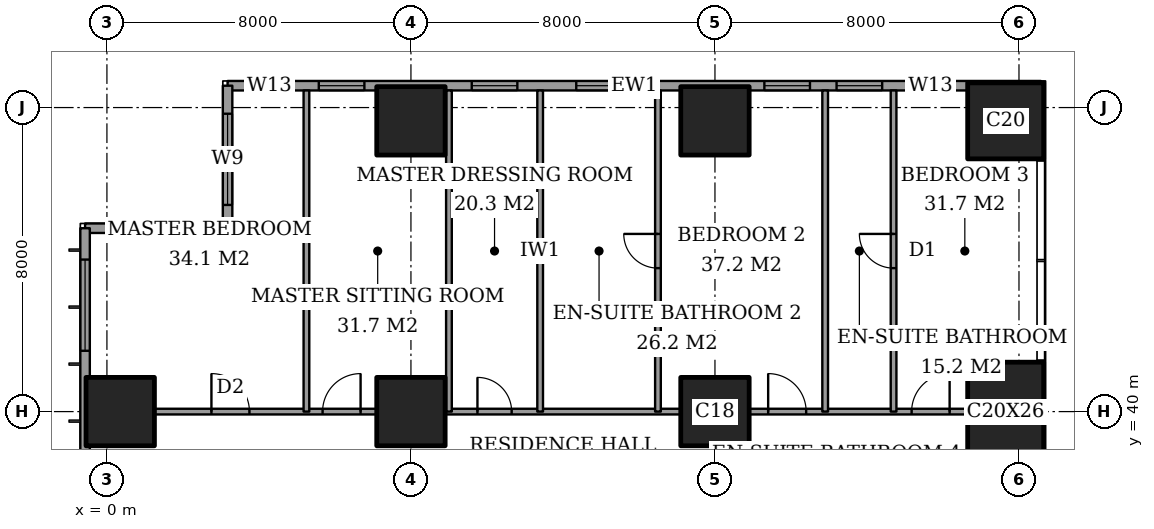
"""IFC4 building model, lengths in metres.
Left out: names, types, materials, properties, quantities, classifications, styles, units other than length and angle.
Written with IfcOpenShell. Run it as: python <this file> out.ifc"""

import sys

from ifc_helpers import new_model, si_unit, direction, frame, frame_2d, origin, origin_2d, place, context, subcontext, project, spatial, rectangle, extrude, element, fill, save


model = new_model("IFC4")
c1 = context("Model", 3, precision=1e-05, world=origin(), true_north=direction((0.0, 1.0)))
c2 = subcontext(c1, "Body", "Model", "MODEL_VIEW")
j1 = project(units=[si_unit("LENGTHUNIT", "METRE"), si_unit("PLANEANGLEUNIT", "RADIAN")], contexts=[c1])
p1 = place(None, origin())
s1 = spatial("IfcSite", under=j1, at=p1, CompositionType="ELEMENT")
p2 = place(p1, origin())
s2 = spatial("IfcBuilding", under=s1, at=p2, CompositionType="ELEMENT")
p3 = place(p2, frame((0.0, 0.0, 185.8)))
s3 = spatial("IfcBuildingStorey", under=s2, at=p3, CompositionType="ELEMENT", Elevation=185.8)
for number, where, z_axis, x_axis in (
    (1, (0.35, 40.0, 0.0), (0.0, 0.0, 1.0), (1.0, 0.0, 0.0)),
    (2, (8.0, 40.0, 0.0), (0.0, 0.0, 1.0), (1.0, 0.0, 0.0)),
    (3, (8.0, 47.65, 0.0), (0.0, 0.0, 1.0), (1.0, 0.0, 0.0)),
    (4, (16.0, 40.0, 0.0), (0.0, 0.0, 1.0), (1.0, 0.0, 0.0)),
    (5, (16.0, 47.65, 0.0), (0.0, 0.0, 1.0), (1.0, 0.0, 0.0)),
):
    element("IfcColumn", number, at=place(p3, frame(where, z_axis=z_axis, x_axis=x_axis)), inside=s3, PredefinedType="COLUMN", context=c2, shape_type="SweptSolid", body=[
        extrude(rectangle(XDim=1.8, YDim=1.8, at=origin_2d()), origin(), (0.0, 0.0, 1.0), 3.6),
    ])
p4 = place(p3, frame((23.65, 40.0, 0.0), z_axis=(0.0, 0.0, 1.0), x_axis=(1.0, 0.0, 0.0)))
e6 = element("IfcColumn", 6, at=p4, inside=s3, PredefinedType="COLUMN", context=c2, shape_type="SweptSolid", body=[
    extrude(rectangle(XDim=2.0, YDim=2.6, at=origin_2d()), origin(), (0.0, 0.0, 1.0), 3.6),
])
p5 = place(p3, frame((23.65, 47.65, 0.0), z_axis=(0.0, 0.0, 1.0), x_axis=(1.0, 0.0, 0.0)))
e7 = element("IfcColumn", 7, at=p5, inside=s3, PredefinedType="COLUMN", context=c2, shape_type="SweptSolid", body=[
    extrude(rectangle(XDim=2.0, YDim=2.0, at=origin_2d()), origin(), (0.0, 0.0, 1.0), 3.6),
])
p6 = place(p3, frame((24.575, 48.575, 0.0), z_axis=(0.0, 0.0, 1.0), x_axis=(-1.0, 0.0, 0.0)))
e8 = element("IfcWall", 8, at=p6, inside=s3, PredefinedType="SOLIDWALL", context=c2, shape_type="SweptSolid", body=[
    extrude(rectangle(XDim=21.4, YDim=0.25, at=frame_2d((10.7, 0.0))), origin(), (0.0, 0.0, 1.0), 3.6),
])
p7 = place(p6, frame((2.3, 0.0, 0.2)))
e9 = element("IfcOpeningElement", 9, at=p7, cuts=e8, PredefinedType="OPENING", context=c2, shape_type="SweptSolid", body=[
    extrude(rectangle(XDim=1.2, YDim=2.4, at=frame_2d((0.6, 1.2))), frame((0.0, 0.135, 0.0), z_axis=(0.0, -1.0, 0.0), x_axis=(1.0, 0.0, 0.0)), (0.0, 0.0, 1.0), 0.27),
])
p8 = place(p6, frame((4.175, 0.0, 0.2)))
e10 = element("IfcOpeningElement", 10, at=p8, cuts=e8, PredefinedType="OPENING", context=c2, shape_type="SweptSolid", body=[
    extrude(rectangle(XDim=1.2, YDim=2.4, at=frame_2d((0.6, 1.2))), frame((0.0, 0.135, 0.0), z_axis=(0.0, -1.0, 0.0), x_axis=(1.0, 0.0, 0.0)), (0.0, 0.0, 1.0), 0.27),
])
p9 = place(p6, frame((6.075, 0.0, 0.2)))
e11 = element("IfcOpeningElement", 11, at=p9, cuts=e8, PredefinedType="OPENING", context=c2, shape_type="SweptSolid", body=[
    extrude(rectangle(XDim=1.2, YDim=2.4, at=frame_2d((0.6, 1.2))), frame((0.0, 0.135, 0.0), z_axis=(0.0, -1.0, 0.0), x_axis=(1.0, 0.0, 0.0)), (0.0, 0.0, 1.0), 0.27),
])
p10 = place(p6, frame((11.025, 0.0, 0.2)))
e12 = element("IfcOpeningElement", 12, at=p10, cuts=e8, PredefinedType="OPENING", context=c2, shape_type="SweptSolid", body=[
    extrude(rectangle(XDim=1.2, YDim=2.4, at=frame_2d((0.6, 1.2))), frame((0.0, 0.135, 0.0), z_axis=(0.0, -1.0, 0.0), x_axis=(1.0, 0.0, 0.0)), (0.0, 0.0, 1.0), 0.27),
])
p11 = place(p6, frame((13.775, 0.0, 0.2)))
e13 = element("IfcOpeningElement", 13, at=p11, cuts=e8, PredefinedType="OPENING", context=c2, shape_type="SweptSolid", body=[
    extrude(rectangle(XDim=1.2, YDim=2.4, at=frame_2d((0.6, 1.2))), frame((0.0, 0.135, 0.0), z_axis=(0.0, -1.0, 0.0), x_axis=(1.0, 0.0, 0.0)), (0.0, 0.0, 1.0), 0.27),
])
p12 = place(p6, frame((17.8, 0.0, 0.2)))
e14 = element("IfcOpeningElement", 14, at=p12, cuts=e8, PredefinedType="OPENING", context=c2, shape_type="SweptSolid", body=[
    extrude(rectangle(XDim=1.2, YDim=2.4, at=frame_2d((0.6, 1.2))), frame((0.0, 0.135, 0.0), z_axis=(0.0, -1.0, 0.0), x_axis=(1.0, 0.0, 0.0)), (0.0, 0.0, 1.0), 0.27),
])
p13 = place(p6, frame((19.7, 0.0, 0.2)))
e15 = element("IfcOpeningElement", 15, at=p13, cuts=e8, PredefinedType="OPENING", context=c2, shape_type="SweptSolid", body=[
    extrude(rectangle(XDim=1.2, YDim=2.4, at=frame_2d((0.6, 1.2))), frame((0.0, 0.135, 0.0), z_axis=(0.0, -1.0, 0.0), x_axis=(1.0, 0.0, 0.0)), (0.0, 0.0, 1.0), 0.27),
])
p14 = place(p3, frame((3.175, 48.575, 0.0), z_axis=(0.0, 0.0, 1.0), x_axis=(0.0, -1.0, 0.0)))
e16 = element("IfcWall", 16, at=p14, inside=s3, PredefinedType="SOLIDWALL", context=c2, shape_type="SweptSolid", body=[
    extrude(rectangle(XDim=3.75, YDim=0.25, at=frame_2d((1.875, 0.0))), origin(), (0.0, 0.0, 1.0), 3.6),
])
p15 = place(p14, frame((0.738, 0.0, 0.2)))
e17 = element("IfcOpeningElement", 17, at=p15, cuts=e16, PredefinedType="OPENING", context=c2, shape_type="SweptSolid", body=[
    extrude(rectangle(XDim=2.4, YDim=2.4, at=frame_2d((1.2, 1.2))), frame((0.0, 0.135, 0.0), z_axis=(0.0, -1.0, 0.0), x_axis=(1.0, 0.0, 0.0)), (0.0, 0.0, 1.0), 0.27),
])
p16 = place(p3, frame((3.175, 44.825, 0.0), z_axis=(0.0, 0.0, 1.0), x_axis=(-1.0, 0.0, 0.0)))
e18 = element("IfcWall", 18, at=p16, inside=s3, PredefinedType="SOLIDWALL", context=c2, shape_type="SweptSolid", body=[
    extrude(rectangle(XDim=3.75, YDim=0.25, at=frame_2d((1.875, 0.0))), origin(), (0.0, 0.0, 1.0), 3.6),
])
p17 = place(p16, frame((0.613, 0.0, 0.2)))
e19 = element("IfcOpeningElement", 19, at=p17, cuts=e18, PredefinedType="OPENING", context=c2, shape_type="SweptSolid", body=[
    extrude(rectangle(XDim=2.4, YDim=2.4, at=frame_2d((1.2, 1.2))), frame((0.0, 0.135, 0.0), z_axis=(0.0, -1.0, 0.0), x_axis=(1.0, 0.0, 0.0)), (0.0, 0.0, 1.0), 0.27),
])
p18 = place(p3, frame((-0.575, 44.825, 0.0), z_axis=(0.0, 0.0, 1.0), x_axis=(0.0, -1.0, 0.0)))
e20 = element("IfcWall", 20, at=p18, inside=s3, PredefinedType="SOLIDWALL", context=c2, shape_type="SweptSolid", body=[
    extrude(rectangle(XDim=41.65, YDim=0.25, at=frame_2d((20.825, 0.0))), origin(), (0.0, 0.0, 1.0), 3.6),
])
p19 = place(p18, frame((0.825, 0.0, 0.2)))
e21 = element("IfcOpeningElement", 21, at=p19, cuts=e20, PredefinedType="OPENING", context=c2, shape_type="SweptSolid", body=[
    extrude(rectangle(XDim=2.4, YDim=2.4, at=frame_2d((1.2, 1.2))), frame((0.0, 0.135, 0.0), z_axis=(0.0, -1.0, 0.0), x_axis=(1.0, 0.0, 0.0)), (0.0, 0.0, 1.0), 0.27),
])
p20 = place(p18, frame((6.05, 0.0, 0.2)))
e22 = element("IfcOpeningElement", 22, at=p20, cuts=e20, PredefinedType="OPENING", context=c2, shape_type="SweptSolid", body=[
    extrude(rectangle(XDim=1.2, YDim=2.4, at=frame_2d((0.6, 1.2))), frame((0.0, 0.135, 0.0), z_axis=(0.0, -1.0, 0.0), x_axis=(1.0, 0.0, 0.0)), (0.0, 0.0, 1.0), 0.27),
])
p21 = place(p18, frame((8.475, 0.0, 0.2)))
e23 = element("IfcOpeningElement", 23, at=p21, cuts=e20, PredefinedType="OPENING", context=c2, shape_type="SweptSolid", body=[
    extrude(rectangle(XDim=2.4, YDim=2.4, at=frame_2d((1.2, 1.2))), frame((0.0, 0.135, 0.0), z_axis=(0.0, -1.0, 0.0), x_axis=(1.0, 0.0, 0.0)), (0.0, 0.0, 1.0), 0.27),
])
p22 = place(p18, frame((15.625, 0.0, 0.2)))
e24 = element("IfcOpeningElement", 24, at=p22, cuts=e20, PredefinedType="OPENING", context=c2, shape_type="SweptSolid", body=[
    extrude(rectangle(XDim=2.4, YDim=2.4, at=frame_2d((1.2, 1.2))), frame((0.0, 0.135, 0.0), z_axis=(0.0, -1.0, 0.0), x_axis=(1.0, 0.0, 0.0)), (0.0, 0.0, 1.0), 0.27),
])
p23 = place(p18, frame((23.625, 0.0, 0.2)))
e25 = element("IfcOpeningElement", 25, at=p23, cuts=e20, PredefinedType="OPENING", context=c2, shape_type="SweptSolid", body=[
    extrude(rectangle(XDim=2.4, YDim=2.4, at=frame_2d((1.2, 1.2))), frame((0.0, 0.135, 0.0), z_axis=(0.0, -1.0, 0.0), x_axis=(1.0, 0.0, 0.0)), (0.0, 0.0, 1.0), 0.27),
])
p24 = place(p18, frame((30.775, 0.0, 0.2)))
e26 = element("IfcOpeningElement", 26, at=p24, cuts=e20, PredefinedType="OPENING", context=c2, shape_type="SweptSolid", body=[
    extrude(rectangle(XDim=2.4, YDim=2.4, at=frame_2d((1.2, 1.2))), frame((0.0, 0.135, 0.0), z_axis=(0.0, -1.0, 0.0), x_axis=(1.0, 0.0, 0.0)), (0.0, 0.0, 1.0), 0.27),
])
p25 = place(p18, frame((34.55, 0.0, 0.2)))
e27 = element("IfcOpeningElement", 27, at=p25, cuts=e20, PredefinedType="OPENING", context=c2, shape_type="SweptSolid", body=[
    extrude(rectangle(XDim=1.2, YDim=2.4, at=frame_2d((0.6, 1.2))), frame((0.0, 0.135, 0.0), z_axis=(0.0, -1.0, 0.0), x_axis=(1.0, 0.0, 0.0)), (0.0, 0.0, 1.0), 0.27),
])
p26 = place(p18, frame((38.425, 0.0, 0.2)))
e28 = element("IfcOpeningElement", 28, at=p26, cuts=e20, PredefinedType="OPENING", context=c2, shape_type="SweptSolid", body=[
    extrude(rectangle(XDim=2.4, YDim=2.4, at=frame_2d((1.2, 1.2))), frame((0.0, 0.135, 0.0), z_axis=(0.0, -1.0, 0.0), x_axis=(1.0, 0.0, 0.0)), (0.0, 0.0, 1.0), 0.27),
])
p27 = place(p3, frame((1.25, 40.0, 0.0), z_axis=(0.0, 0.0, 1.0), x_axis=(1.0, 0.0, 0.0)))
e29 = element("IfcWall", 29, at=p27, inside=s3, PredefinedType="PARTITIONING", context=c2, shape_type="SweptSolid", body=[
    extrude(rectangle(XDim=5.85, YDim=0.15, at=frame_2d((2.925, 0.0))), origin(), (0.0, 0.0, 1.0), 3.35),
])
p28 = place(p27, frame((1.5, 0.0, 0.0)))
e30 = element("IfcOpeningElement", 30, at=p28, cuts=e29, PredefinedType="OPENING", context=c2, shape_type="SweptSolid", body=[
    extrude(rectangle(XDim=1.0, YDim=2.1, at=frame_2d((0.5, 1.05))), frame((0.0, 0.085, 0.0), z_axis=(0.0, -1.0, 0.0), x_axis=(1.0, 0.0, 0.0)), (0.0, 0.0, 1.0), 0.17),
])
p29 = place(p27, frame((4.425, 0.0, 0.0)))
e31 = element("IfcOpeningElement", 31, at=p29, cuts=e29, PredefinedType="OPENING", context=c2, shape_type="SweptSolid", body=[
    extrude(rectangle(XDim=1.0, YDim=2.1, at=frame_2d((0.5, 1.05))), frame((0.0, 0.085, 0.0), z_axis=(0.0, -1.0, 0.0), x_axis=(1.0, 0.0, 0.0)), (0.0, 0.0, 1.0), 0.17),
])
p30 = place(p3, frame((8.9, 40.0, 0.0), z_axis=(0.0, 0.0, 1.0), x_axis=(1.0, 0.0, 0.0)))
e32 = element("IfcWall", 32, at=p30, inside=s3, PredefinedType="PARTITIONING", context=c2, shape_type="SweptSolid", body=[
    extrude(rectangle(XDim=6.2, YDim=0.15, at=frame_2d((3.1, 0.0))), origin(), (0.0, 0.0, 1.0), 3.35),
])
p31 = place(p30, frame((0.85, 0.0, 0.0)))
e33 = element("IfcOpeningElement", 33, at=p31, cuts=e32, PredefinedType="OPENING", context=c2, shape_type="SweptSolid", body=[
    extrude(rectangle(XDim=0.9, YDim=2.1, at=frame_2d((0.45, 1.05))), frame((0.0, 0.085, 0.0), z_axis=(0.0, -1.0, 0.0), x_axis=(1.0, 0.0, 0.0)), (0.0, 0.0, 1.0), 0.17),
])
p32 = place(p3, frame((16.9, 40.0, 0.0), z_axis=(0.0, 0.0, 1.0), x_axis=(1.0, 0.0, 0.0)))
e34 = element("IfcWall", 34, at=p32, inside=s3, PredefinedType="PARTITIONING", context=c2, shape_type="SweptSolid", body=[
    extrude(rectangle(XDim=5.75, YDim=0.15, at=frame_2d((2.875, 0.0))), origin(), (0.0, 0.0, 1.0), 3.35),
])
p33 = place(p32, frame((0.5, 0.0, 0.0)))
e35 = element("IfcOpeningElement", 35, at=p33, cuts=e34, PredefinedType="OPENING", context=c2, shape_type="SweptSolid", body=[
    extrude(rectangle(XDim=1.0, YDim=2.1, at=frame_2d((0.5, 1.05))), frame((0.0, 0.085, 0.0), z_axis=(0.0, -1.0, 0.0), x_axis=(1.0, 0.0, 0.0)), (0.0, 0.0, 1.0), 0.17),
])
p34 = place(p32, frame((4.275, 0.0, 0.0)))
e36 = element("IfcOpeningElement", 36, at=p34, cuts=e34, PredefinedType="OPENING", context=c2, shape_type="SweptSolid", body=[
    extrude(rectangle(XDim=1.0, YDim=2.1, at=frame_2d((0.5, 1.05))), frame((0.0, 0.085, 0.0), z_axis=(0.0, -1.0, 0.0), x_axis=(1.0, 0.0, 0.0)), (0.0, 0.0, 1.0), 0.17),
])
for number, where, z_axis, x_axis in (
    (37, (5.25, 40.0, 0.0), (0.0, 0.0, 1.0), (0.0, 1.0, 0.0)),
    (38, (9.0, 40.0, 0.0), (0.0, 0.0, 1.0), (0.0, 1.0, 0.0)),
    (39, (11.4, 40.0, 0.0), (0.0, 0.0, 1.0), (0.0, 1.0, 0.0)),
):
    element("IfcWall", number, at=place(p3, frame(where, z_axis=z_axis, x_axis=x_axis)), inside=s3, PredefinedType="PARTITIONING", context=c2, shape_type="SweptSolid", body=[
        extrude(rectangle(XDim=8.45, YDim=0.15, at=frame_2d((4.225, 0.0))), origin(), (0.0, 0.0, 1.0), 3.35),
    ])
p35 = place(p3, frame((14.5, 40.0, 0.0), z_axis=(0.0, 0.0, 1.0), x_axis=(0.0, 1.0, 0.0)))
e40 = element("IfcWall", 40, at=p35, inside=s3, PredefinedType="PARTITIONING", context=c2, shape_type="SweptSolid", body=[
    extrude(rectangle(XDim=8.45, YDim=0.15, at=frame_2d((4.225, 0.0))), origin(), (0.0, 0.0, 1.0), 3.35),
])
p36 = place(p35, frame((3.775, 0.0, 0.0)))
e41 = element("IfcOpeningElement", 41, at=p36, cuts=e40, PredefinedType="OPENING", context=c2, shape_type="SweptSolid", body=[
    extrude(rectangle(XDim=0.9, YDim=2.1, at=frame_2d((0.45, 1.05))), frame((0.0, 0.085, 0.0), z_axis=(0.0, -1.0, 0.0), x_axis=(1.0, 0.0, 0.0)), (0.0, 0.0, 1.0), 0.17),
])
p37 = place(p3, frame((18.9, 40.0, 0.0), z_axis=(0.0, 0.0, 1.0), x_axis=(0.0, 1.0, 0.0)))
e42 = element("IfcWall", 42, at=p37, inside=s3, PredefinedType="PARTITIONING", context=c2, shape_type="SweptSolid", body=[
    extrude(rectangle(XDim=8.45, YDim=0.15, at=frame_2d((4.225, 0.0))), origin(), (0.0, 0.0, 1.0), 3.35),
])
p38 = place(p3, frame((20.7, 40.0, 0.0), z_axis=(0.0, 0.0, 1.0), x_axis=(0.0, 1.0, 0.0)))
e43 = element("IfcWall", 43, at=p38, inside=s3, PredefinedType="PARTITIONING", context=c2, shape_type="SweptSolid", body=[
    extrude(rectangle(XDim=8.45, YDim=0.15, at=frame_2d((4.225, 0.0))), origin(), (0.0, 0.0, 1.0), 3.35),
])
p39 = place(p38, frame((3.775, 0.0, 0.0)))
e44 = element("IfcOpeningElement", 44, at=p39, cuts=e43, PredefinedType="OPENING", context=c2, shape_type="SweptSolid", body=[
    extrude(rectangle(XDim=0.9, YDim=2.1, at=frame_2d((0.45, 1.05))), frame((0.0, 0.085, 0.0), z_axis=(0.0, -1.0, 0.0), x_axis=(1.0, 0.0, 0.0)), (0.0, 0.0, 1.0), 0.17),
])
p40 = place(p7, origin())
e45 = element("IfcWindow", 45, at=p40, inside=s3, PartitioningType="SINGLE_PANEL", PredefinedType="WINDOW", context=c2, shape_type="SweptSolid", body=[
    extrude(rectangle(XDim=1.2, YDim=2.4, at=frame_2d((0.6, 1.2))), frame((0.0, 0.03, 0.0), z_axis=(0.0, -1.0, 0.0), x_axis=(1.0, 0.0, 0.0)), (0.0, 0.0, 1.0), 0.06),
])
fill(e9, e45)
p41 = place(p8, origin())
e46 = element("IfcWindow", 46, at=p41, inside=s3, PartitioningType="SINGLE_PANEL", PredefinedType="WINDOW", context=c2, shape_type="SweptSolid", body=[
    extrude(rectangle(XDim=1.2, YDim=2.4, at=frame_2d((0.6, 1.2))), frame((0.0, 0.03, 0.0), z_axis=(0.0, -1.0, 0.0), x_axis=(1.0, 0.0, 0.0)), (0.0, 0.0, 1.0), 0.06),
])
fill(e10, e46)
p42 = place(p9, origin())
e47 = element("IfcWindow", 47, at=p42, inside=s3, PartitioningType="SINGLE_PANEL", PredefinedType="WINDOW", context=c2, shape_type="SweptSolid", body=[
    extrude(rectangle(XDim=1.2, YDim=2.4, at=frame_2d((0.6, 1.2))), frame((0.0, 0.03, 0.0), z_axis=(0.0, -1.0, 0.0), x_axis=(1.0, 0.0, 0.0)), (0.0, 0.0, 1.0), 0.06),
])
fill(e11, e47)
p43 = place(p10, origin())
e48 = element("IfcWindow", 48, at=p43, inside=s3, PartitioningType="SINGLE_PANEL", PredefinedType="WINDOW", context=c2, shape_type="SweptSolid", body=[
    extrude(rectangle(XDim=1.2, YDim=2.4, at=frame_2d((0.6, 1.2))), frame((0.0, 0.03, 0.0), z_axis=(0.0, -1.0, 0.0), x_axis=(1.0, 0.0, 0.0)), (0.0, 0.0, 1.0), 0.06),
])
fill(e12, e48)
p44 = place(p11, origin())
e49 = element("IfcWindow", 49, at=p44, inside=s3, PartitioningType="SINGLE_PANEL", PredefinedType="WINDOW", context=c2, shape_type="SweptSolid", body=[
    extrude(rectangle(XDim=1.2, YDim=2.4, at=frame_2d((0.6, 1.2))), frame((0.0, 0.03, 0.0), z_axis=(0.0, -1.0, 0.0), x_axis=(1.0, 0.0, 0.0)), (0.0, 0.0, 1.0), 0.06),
])
fill(e13, e49)
p45 = place(p12, origin())
e50 = element("IfcWindow", 50, at=p45, inside=s3, PartitioningType="SINGLE_PANEL", PredefinedType="WINDOW", context=c2, shape_type="SweptSolid", body=[
    extrude(rectangle(XDim=1.2, YDim=2.4, at=frame_2d((0.6, 1.2))), frame((0.0, 0.03, 0.0), z_axis=(0.0, -1.0, 0.0), x_axis=(1.0, 0.0, 0.0)), (0.0, 0.0, 1.0), 0.06),
])
fill(e14, e50)
p46 = place(p13, origin())
e51 = element("IfcWindow", 51, at=p46, inside=s3, PartitioningType="SINGLE_PANEL", PredefinedType="WINDOW", context=c2, shape_type="SweptSolid", body=[
    extrude(rectangle(XDim=1.2, YDim=2.4, at=frame_2d((0.6, 1.2))), frame((0.0, 0.03, 0.0), z_axis=(0.0, -1.0, 0.0), x_axis=(1.0, 0.0, 0.0)), (0.0, 0.0, 1.0), 0.06),
])
fill(e15, e51)
p47 = place(p15, origin())
e52 = element("IfcWindow", 52, at=p47, inside=s3, PartitioningType="SINGLE_PANEL", PredefinedType="WINDOW", context=c2, shape_type="SweptSolid", body=[
    extrude(rectangle(XDim=2.4, YDim=2.4, at=frame_2d((1.2, 1.2))), frame((0.0, 0.03, 0.0), z_axis=(0.0, -1.0, 0.0), x_axis=(1.0, 0.0, 0.0)), (0.0, 0.0, 1.0), 0.06),
])
fill(e17, e52)
p48 = place(p17, origin())
e53 = element("IfcWindow", 53, at=p48, inside=s3, PartitioningType="SINGLE_PANEL", PredefinedType="WINDOW", context=c2, shape_type="SweptSolid", body=[
    extrude(rectangle(XDim=2.4, YDim=2.4, at=frame_2d((1.2, 1.2))), frame((0.0, 0.03, 0.0), z_axis=(0.0, -1.0, 0.0), x_axis=(1.0, 0.0, 0.0)), (0.0, 0.0, 1.0), 0.06),
])
fill(e19, e53)
p49 = place(p19, origin())
e54 = element("IfcWindow", 54, at=p49, inside=s3, PartitioningType="SINGLE_PANEL", PredefinedType="WINDOW", context=c2, shape_type="SweptSolid", body=[
    extrude(rectangle(XDim=2.4, YDim=2.4, at=frame_2d((1.2, 1.2))), frame((0.0, 0.03, 0.0), z_axis=(0.0, -1.0, 0.0), x_axis=(1.0, 0.0, 0.0)), (0.0, 0.0, 1.0), 0.06),
])
fill(e21, e54)
p50 = place(p28, origin())
e55 = element("IfcDoor", 55, at=p50, inside=s3, OperationType="SINGLE_SWING_RIGHT", PredefinedType="DOOR", context=c2, shape_type="SweptSolid", body=[
    extrude(rectangle(XDim=1.0, YDim=2.1, at=frame_2d((0.5, 1.05))), frame((0.0, 0.025, 0.0), z_axis=(0.0, -1.0, 0.0), x_axis=(1.0, 0.0, 0.0)), (0.0, 0.0, 1.0), 0.05),
])
fill(e30, e55)
p51 = place(p29, origin())
e56 = element("IfcDoor", 56, at=p51, inside=s3, OperationType="SINGLE_SWING_LEFT", PredefinedType="DOOR", context=c2, shape_type="SweptSolid", body=[
    extrude(rectangle(XDim=1.0, YDim=2.1, at=frame_2d((0.5, 1.05))), frame((0.0, 0.025, 0.0), z_axis=(0.0, -1.0, 0.0), x_axis=(1.0, 0.0, 0.0)), (0.0, 0.0, 1.0), 0.05),
])
fill(e31, e56)
p52 = place(p31, origin())
e57 = element("IfcDoor", 57, at=p52, inside=s3, OperationType="SINGLE_SWING_RIGHT", PredefinedType="DOOR", context=c2, shape_type="SweptSolid", body=[
    extrude(rectangle(XDim=0.9, YDim=2.1, at=frame_2d((0.45, 1.05))), frame((0.0, 0.025, 0.0), z_axis=(0.0, -1.0, 0.0), x_axis=(1.0, 0.0, 0.0)), (0.0, 0.0, 1.0), 0.05),
])
fill(e33, e57)
p53 = place(p36, origin())
e58 = element("IfcDoor", 58, at=p53, inside=s3, OperationType="SINGLE_SWING_LEFT", PredefinedType="DOOR", context=c2, shape_type="SweptSolid", body=[
    extrude(rectangle(XDim=0.9, YDim=2.1, at=frame_2d((0.45, 1.05))), frame((0.0, 0.025, 0.0), z_axis=(0.0, -1.0, 0.0), x_axis=(1.0, 0.0, 0.0)), (0.0, 0.0, 1.0), 0.05),
])
fill(e41, e58)
p54 = place(p33, origin())
e59 = element("IfcDoor", 59, at=p54, inside=s3, OperationType="SINGLE_SWING_RIGHT", PredefinedType="DOOR", context=c2, shape_type="SweptSolid", body=[
    extrude(rectangle(XDim=1.0, YDim=2.1, at=frame_2d((0.5, 1.05))), frame((0.0, 0.025, 0.0), z_axis=(0.0, -1.0, 0.0), x_axis=(1.0, 0.0, 0.0)), (0.0, 0.0, 1.0), 0.05),
])
fill(e35, e59)
p55 = place(p39, origin())
e60 = element("IfcDoor", 60, at=p55, inside=s3, OperationType="SINGLE_SWING_LEFT", PredefinedType="DOOR", context=c2, shape_type="SweptSolid", body=[
    extrude(rectangle(XDim=0.9, YDim=2.1, at=frame_2d((0.45, 1.05))), frame((0.0, 0.025, 0.0), z_axis=(0.0, -1.0, 0.0), x_axis=(1.0, 0.0, 0.0)), (0.0, 0.0, 1.0), 0.05),
])
fill(e44, e60)
p56 = place(p34, origin())
e61 = element("IfcDoor", 61, at=p56, inside=s3, OperationType="SINGLE_SWING_LEFT", PredefinedType="DOOR", context=c2, shape_type="SweptSolid", body=[
    extrude(rectangle(XDim=1.0, YDim=2.1, at=frame_2d((0.5, 1.05))), frame((0.0, 0.025, 0.0), z_axis=(0.0, -1.0, 0.0), x_axis=(1.0, 0.0, 0.0)), (0.0, 0.0, 1.0), 0.05),
])
fill(e36, e61)
save(model, sys.argv[1])
